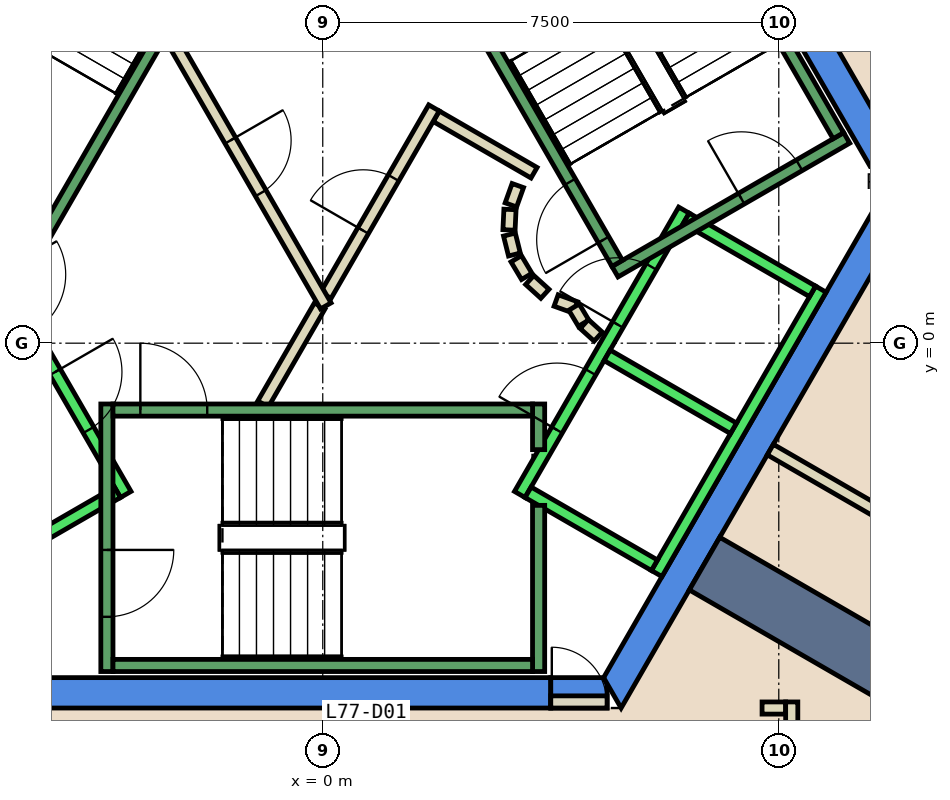
"""IFC4 building model, lengths in metres.
Left out: names, types, materials, properties, quantities, classifications, styles, units other than length and angle.
Written with IfcOpenShell. Run it as: python <this file> out.ifc"""

import sys

from ifc_helpers import new_model, si_unit, direction, frame, frame_2d, origin, place, context, subcontext, project, spatial, polyline, rectangle, outline, extrude, element, fill, save


model = new_model("IFC4")
c1 = context("Model", 3, precision=1e-05, world=origin(), true_north=direction((0.0, 1.0)))
c2 = subcontext(c1, "Body", "Model", "MODEL_VIEW")
j1 = project(units=[si_unit("LENGTHUNIT", "METRE"), si_unit("PLANEANGLEUNIT", "RADIAN")], contexts=[c1])
p1 = place(None, origin())
s1 = spatial("IfcSite", under=j1, at=p1, CompositionType="ELEMENT")
p2 = place(p1, origin())
s2 = spatial("IfcBuilding", under=s1, at=p2, CompositionType="ELEMENT")
p3 = place(p2, frame((0.0, 0.0, 326.0)))
s3 = spatial("IfcBuildingStorey", under=s2, at=p3, CompositionType="ELEMENT", Elevation=326.0)
p4 = place(p3, frame((0.0, 0.0, -0.6)))
e1 = element("IfcWall", 1, at=p4, inside=s3, PredefinedType="SHEAR", context=c2, shape_type="SweptSolid", body=[
    extrude(outline(polyline([(5.486, 9.998), (5.053, 9.748), (9.238, 2.5), (9.815, 2.5), (5.486, 9.998)])), origin(), (0.0, 0.0, 1.0), 5.55),
])
p5 = place(p3, frame((0.0, 0.0, -0.6)))
e2 = element("IfcWall", 2, at=p5, inside=s3, PredefinedType="SHEAR", context=c2, shape_type="SweptSolid", body=[
    extrude(outline(polyline([(3.75, -6.0), (3.75, -5.5), (-4.619, -5.5), (-4.907, -6.0), (3.75, -6.0)])), origin(), (0.0, 0.0, 1.0), 5.55),
])
p6 = place(p3, frame((0.0, 0.0, 3.6)))
e3 = element("IfcWall", 3, at=p6, inside=s3, PredefinedType="SHEAR", context=c2, shape_type="SweptSolid", body=[
    extrude(outline(polyline([(4.676, -6.0), (4.676, -5.6), (4.619, -5.5), (3.75, -5.5), (3.75, -6.0), (4.676, -6.0)])), origin(), (0.0, 0.0, 1.0), 1.35),
])
p7 = place(p3, frame((0.0, 0.0, -0.6)))
e4 = element("IfcWall", 4, at=p7, inside=s3, PredefinedType="SHEAR", context=c2, shape_type="SweptSolid", body=[
    extrude(outline(polyline([(4.907, -6.0), (9.815, 2.5), (9.238, 2.5), (4.619, -5.5), (4.907, -6.0)])), origin(), (0.0, 0.0, 1.0), 5.55),
])
p8 = place(p3, frame((6.279, -3.625, 0.0), z_axis=(0.0, 0.0, 1.0), x_axis=(0.866025543801, -0.499999757484, 0.0)))
e5 = element("IfcWall", 5, at=p8, inside=s3, PredefinedType="SHEAR", context=c2, shape_type="SweptSolid", body=[
    extrude(rectangle(XDim=17.452, YDim=1.0, at=frame_2d((8.726, 0.0))), origin(), (0.0, 0.0, 1.0), 4.95),
])
p9 = place(p3, frame((-0.982, -1.0, 0.0), z_axis=(0.0, 0.0, 1.0), x_axis=(0.50024047865, 0.865886518847, 0.0)))
e6 = element("IfcWall", 6, at=p9, inside=s3, PredefinedType="PARTITIONING", context=c2, shape_type="SweptSolid", body=[
    extrude(rectangle(XDim=1.863, YDim=0.2, at=frame_2d((0.931, 0.0))), origin(), (0.0, 0.0, 1.0), 4.95),
])
p10 = place(p3, frame((1.866, 3.732, 0.0), z_axis=(0.0, 0.0, 1.0), x_axis=(0.866043361281, -0.499968895414, 0.0)))
e7 = element("IfcWall", 7, at=p10, inside=s3, PredefinedType="PARTITIONING", context=c2, shape_type="SweptSolid", body=[
    extrude(rectangle(XDim=1.858, YDim=0.2, at=frame_2d((0.929, 0.0))), origin(), (0.0, 0.0, 1.0), 4.95),
])
p11 = place(p3, frame((3.208, 2.592, 0.0), z_axis=(0.0, 0.0, 1.0), x_axis=(-0.337388820924, -0.941365382578, 0.0)))
e8 = element("IfcWall", 8, at=p11, inside=s3, PredefinedType="PARTITIONING", context=c2, shape_type="SweptSolid", body=[
    extrude(rectangle(XDim=0.338, YDim=0.2, at=frame_2d((0.169, 0.0))), origin(), (0.0, 0.0, 1.0), 4.95),
])
p12 = place(p3, frame((3.079, 2.199, 0.0), z_axis=(0.0, 0.0, 1.0), x_axis=(-0.047771483479, -0.998858290933, 0.0)))
e9 = element("IfcWall", 9, at=p12, inside=s3, PredefinedType="PARTITIONING", context=c2, shape_type="SweptSolid", body=[
    extrude(rectangle(XDim=0.337, YDim=0.2, at=frame_2d((0.169, 0.0))), origin(), (0.0, 0.0, 1.0), 4.95),
])
p13 = place(p3, frame((3.07, 1.786, 0.0), z_axis=(0.0, 0.0, 1.0), x_axis=(0.242705583207, -0.970099994784, 0.0)))
e10 = element("IfcWall", 10, at=p13, inside=s3, PredefinedType="PARTITIONING", context=c2, shape_type="SweptSolid", body=[
    extrude(rectangle(XDim=0.338, YDim=0.2, at=frame_2d((0.169, 0.0))), origin(), (0.0, 0.0, 1.0), 4.95),
])
for number, where, z_axis, x_axis in (
    (11, (3.182, 1.388, 0.0), (0.0, 0.0, 1.0), (0.512, -0.859, 0.0)),
    (12, (3.404, 1.039, 0.0), (0.0, 0.0, 1.0), (0.74, -0.672, 0.0)),
):
    element("IfcWall", number, at=place(p3, frame(where, z_axis=z_axis, x_axis=x_axis)), inside=s3, PredefinedType="PARTITIONING", context=c2, shape_type="SweptSolid", body=[
        extrude(rectangle(XDim=0.338, YDim=0.2, at=frame_2d((0.169, 0.0))), origin(), (0.0, 0.0, 1.0), 4.95),
    ])
p14 = place(p3, frame((3.838, 0.702, 0.0), z_axis=(0.0, 0.0, 1.0), x_axis=(0.941035081519, -0.338308993895, 0.0)))
e13 = element("IfcWall", 13, at=p14, inside=s3, PredefinedType="PARTITIONING", context=c2, shape_type="SweptSolid", body=[
    extrude(rectangle(XDim=0.337, YDim=0.2, at=frame_2d((0.168, 0.0))), origin(), (0.0, 0.0, 1.0), 4.95),
])
p15 = place(p3, frame((4.132, 0.593, 0.0), z_axis=(0.0, 0.0, 1.0), x_axis=(0.513561617048, -0.858052717201, 0.0)))
e14 = element("IfcWall", 14, at=p15, inside=s3, PredefinedType="PARTITIONING", context=c2, shape_type="SweptSolid", body=[
    extrude(rectangle(XDim=0.308, YDim=0.2, at=frame_2d((0.154, 0.0))), origin(), (0.0, 0.0, 1.0), 4.95),
])
p16 = place(p3, frame((4.301, 0.315, 0.0), z_axis=(0.0, 0.0, 1.0), x_axis=(0.741798017506, -0.670623367639, 0.0)))
e15 = element("IfcWall", 15, at=p16, inside=s3, PredefinedType="PARTITIONING", context=c2, shape_type="SweptSolid", body=[
    extrude(rectangle(XDim=0.309, YDim=0.2, at=frame_2d((0.154, 0.0))), origin(), (0.0, 0.0, 1.0), 4.95),
])
p17 = place(p3, frame((0.05, 0.787, 0.0), z_axis=(0.0, 0.0, 1.0), x_axis=(0.499954076797, 0.866051915934, 0.0)))
e16 = element("IfcWall", 16, at=p17, inside=s3, PredefinedType="PARTITIONING", context=c2, shape_type="SweptSolid", body=[
    extrude(rectangle(XDim=3.558, YDim=0.2, at=frame_2d((1.779, 0.0))), origin(), (0.0, 0.0, 1.0), 4.95),
])
p18 = place(p17, frame((1.229, 0.0, 0.0)))
e17 = element("IfcOpeningElement", 17, at=p18, cuts=e16, PredefinedType="OPENING", context=c2, shape_type="SweptSolid", body=[
    extrude(rectangle(XDim=1.0, YDim=2.1, at=frame_2d((0.5, 1.05))), frame((0.0, 0.11, 0.0), z_axis=(0.0, -1.0, 0.0), x_axis=(1.0, 0.0, 0.0)), (0.0, 0.0, 1.0), 0.22),
])
p19 = place(p3, frame((-2.54, 5.1, 0.0), z_axis=(0.0, 0.0, 1.0), x_axis=(0.499925051871, -0.866068670783, 0.0)))
e18 = element("IfcWall", 18, at=p19, inside=s3, PredefinedType="PARTITIONING", context=c2, shape_type="SweptSolid", body=[
    extrude(rectangle(XDim=5.181, YDim=0.2, at=frame_2d((2.59, 0.0))), origin(), (0.0, 0.0, 1.0), 4.95),
])
p20 = place(p19, frame((2.04, 0.0, 0.0)))
e19 = element("IfcOpeningElement", 19, at=p20, cuts=e18, PredefinedType="OPENING", context=c2, shape_type="SweptSolid", body=[
    extrude(rectangle(XDim=1.0, YDim=2.1, at=frame_2d((0.5, 1.05))), frame((0.0, 0.11, 0.0), z_axis=(0.0, -1.0, 0.0), x_axis=(1.0, 0.0, 0.0)), (0.0, 0.0, 1.0), 0.22),
])
p21 = place(p3, frame((0.713, -6.0, 0.0), z_axis=(0.0, 0.0, 1.0), x_axis=(0.0, -1.0, 0.0)))
e20 = element("IfcWall", 20, at=p21, inside=s3, PredefinedType="PARTITIONING", context=c2, shape_type="SweptSolid", body=[
    extrude(rectangle(XDim=2.95, YDim=0.2, at=frame_2d((1.475, 0.0))), origin(), (0.0, 0.0, 1.0), 4.95),
])
p22 = place(p21, frame((0.586, 0.0, 0.0)))
e21 = element("IfcOpeningElement", 21, at=p22, cuts=e20, PredefinedType="OPENING", context=c2, shape_type="SweptSolid", body=[
    extrude(rectangle(XDim=1.0, YDim=2.1, at=frame_2d((0.5, 1.05))), frame((0.0, 0.11, 0.0), z_axis=(0.0, -1.0, 0.0), x_axis=(1.0, 0.0, 0.0)), (0.0, 0.0, 1.0), 0.22),
])
p23 = place(p3, frame((7.225, -6.0, 0.0), z_axis=(0.0, 0.0, 1.0), x_axis=(1.0, 0.0, 0.0)))
e22 = element("IfcWall", 22, at=p23, inside=s3, PredefinedType="PARTITIONING", context=c2, shape_type="SweptSolid", body=[
    extrude(rectangle(XDim=0.388, YDim=0.2, at=frame_2d((0.194, 0.0))), origin(), (0.0, 0.0, 1.0), 2.55),
])
p24 = place(p3, frame((7.713, -5.9, 0.0), z_axis=(0.0, 0.0, 1.0), x_axis=(0.0, -1.0, 0.0)))
e23 = element("IfcWall", 23, at=p24, inside=s3, PredefinedType="PARTITIONING", context=c2, shape_type="SweptSolid", body=[
    extrude(rectangle(XDim=0.574, YDim=0.2, at=frame_2d((0.287, 0.0))), origin(), (0.0, 0.0, 1.0), 2.55),
])
p25 = place(p3, frame((7.361, -1.75, 0.0), z_axis=(0.0, 0.0, 1.0), x_axis=(0.866053019151, -0.499952165731, 0.0)))
e24 = element("IfcWall", 24, at=p25, inside=s3, PredefinedType="PARTITIONING", context=c2, shape_type="SweptSolid", body=[
    extrude(rectangle(XDim=2.3, YDim=0.2, at=frame_2d((1.15, 0.0))), origin(), (0.0, 0.0, 1.0), 4.95),
])
p26 = place(p3, frame((3.75, -5.9, 0.0), z_axis=(0.0, 0.0, 1.0), x_axis=(1.0, 0.0, 0.0)))
e25 = element("IfcWall", 25, at=p26, inside=s3, PredefinedType="PARTITIONING", context=c2, shape_type="SweptSolid", body=[
    extrude(rectangle(XDim=0.926, YDim=0.2, at=frame_2d((0.463, 0.0))), origin(), (0.0, 0.0, 1.0), 2.4),
])
p27 = place(p26, frame((0.017, 0.0, 0.0)))
e26 = element("IfcOpeningElement", 26, at=p27, cuts=e25, PredefinedType="OPENING", context=c2, shape_type="SweptSolid", body=[
    extrude(rectangle(XDim=0.9, YDim=2.1, at=frame_2d((0.45, 1.05))), frame((0.0, 0.11, 0.0), z_axis=(0.0, -1.0, 0.0), x_axis=(1.0, 0.0, 0.0)), (0.0, 0.0, 1.0), 0.22),
])
p28 = place(p3, frame((-5.94, 2.188, 0.0), z_axis=(0.0, 0.0, 1.0), x_axis=(0.500034260056, -0.866005622828, 0.0)))
e27 = element("IfcWall", 27, at=p28, inside=s3, PredefinedType="STANDARD", context=c2, shape_type="SweptSolid", body=[
    extrude(rectangle(XDim=5.399, YDim=0.2, at=frame_2d((2.7, 0.0))), origin(), (0.0, 0.0, 1.0), 4.95),
])
p29 = place(p28, frame((3.075, 0.0, 0.0)))
e28 = element("IfcOpeningElement", 28, at=p29, cuts=e27, PredefinedType="OPENING", context=c2, shape_type="SweptSolid", body=[
    extrude(rectangle(XDim=1.1, YDim=2.1, at=frame_2d((0.55, 1.05))), frame((0.0, 0.11, 0.0), z_axis=(0.0, -1.0, 0.0), x_axis=(1.0, 0.0, 0.0)), (0.0, 0.0, 1.0), 0.22),
])
p30 = place(p28, frame((1.225, 0.0, 0.0)))
e29 = element("IfcOpeningElement", 29, at=p30, cuts=e27, PredefinedType="OPENING", context=c2, shape_type="SweptSolid", body=[
    extrude(rectangle(XDim=1.1, YDim=2.1, at=frame_2d((0.55, 1.05))), frame((0.0, 0.11, 0.0), z_axis=(0.0, -1.0, 0.0), x_axis=(1.0, 0.0, 0.0)), (0.0, 0.0, 1.0), 0.22),
])
p31 = place(p3, frame((-3.377, -2.452, 0.0), z_axis=(0.0, 0.0, 1.0), x_axis=(-0.865955154139, -0.50012165622, 0.0)))
e30 = element("IfcWall", 30, at=p31, inside=s3, PredefinedType="STANDARD", context=c2, shape_type="SweptSolid", body=[
    extrude(rectangle(XDim=2.4, YDim=0.2, at=frame_2d((1.2, 0.0))), origin(), (0.0, 0.0, 1.0), 4.95),
])
p32 = place(p3, frame((3.24, -2.488, 0.0), z_axis=(0.0, 0.0, 1.0), x_axis=(0.500034260056, 0.866005622828, 0.0)))
e31 = element("IfcWall", 31, at=p32, inside=s3, PredefinedType="STANDARD", context=c2, shape_type="SweptSolid", body=[
    extrude(rectangle(XDim=5.399, YDim=0.2, at=frame_2d((2.7, 0.0))), origin(), (0.0, 0.0, 1.0), 4.95),
])
p33 = place(p32, frame((3.225, 0.0, 0.0)))
e32 = element("IfcOpeningElement", 32, at=p33, cuts=e31, PredefinedType="OPENING", context=c2, shape_type="SweptSolid", body=[
    extrude(rectangle(XDim=1.1, YDim=2.1, at=frame_2d((0.55, 1.05))), frame((0.0, 0.11, 0.0), z_axis=(0.0, -1.0, 0.0), x_axis=(1.0, 0.0, 0.0)), (0.0, 0.0, 1.0), 0.22),
])
p34 = place(p32, frame((1.225, 0.0, 0.0)))
e33 = element("IfcOpeningElement", 33, at=p34, cuts=e31, PredefinedType="OPENING", context=c2, shape_type="SweptSolid", body=[
    extrude(rectangle(XDim=1.1, YDim=2.1, at=frame_2d((0.55, 1.05))), frame((0.0, 0.11, 0.0), z_axis=(0.0, -1.0, 0.0), x_axis=(1.0, 0.0, 0.0)), (0.0, 0.0, 1.0), 0.22),
])
p35 = place(p3, frame((5.492, -3.788, 0.0), z_axis=(0.0, 0.0, 1.0), x_axis=(0.500034260056, 0.866005622828, 0.0)))
e34 = element("IfcWall", 34, at=p35, inside=s3, PredefinedType="STANDARD", context=c2, shape_type="SweptSolid", body=[
    extrude(rectangle(XDim=5.399, YDim=0.2, at=frame_2d((2.7, 0.0))), origin(), (0.0, 0.0, 1.0), 4.95),
])
p36 = place(p3, frame((3.377, -2.452, 0.0), z_axis=(0.0, 0.0, 1.0), x_axis=(0.865955154139, -0.50012165622, 0.0)))
e35 = element("IfcWall", 35, at=p36, inside=s3, PredefinedType="STANDARD", context=c2, shape_type="SweptSolid", body=[
    extrude(rectangle(XDim=2.4, YDim=0.2, at=frame_2d((1.2, 0.0))), origin(), (0.0, 0.0, 1.0), 4.95),
])
for number, where, z_axis, x_axis in (
    (36, (4.677, -0.2, 0.0), (0.0, 0.0, 1.0), (0.866, -0.5, 0.0)),
    (37, (5.977, 2.052, 0.0), (0.0, 0.0, 1.0), (0.866, -0.5, 0.0)),
):
    element("IfcWall", number, at=place(p3, frame(where, z_axis=z_axis, x_axis=x_axis)), inside=s3, PredefinedType="STANDARD", context=c2, shape_type="SweptSolid", body=[
        extrude(rectangle(XDim=2.399, YDim=0.2, at=frame_2d((1.2, 0.0))), origin(), (0.0, 0.0, 1.0), 4.95),
    ])
p37 = place(p3, frame((-3.55, -1.0, 0.0), z_axis=(0.0, 0.0, 1.0), x_axis=(0.0, -1.0, 0.0)))
e38 = element("IfcWall", 38, at=p37, inside=s3, PredefinedType="STANDARD", context=c2, shape_type="SweptSolid", body=[
    extrude(rectangle(XDim=4.4, YDim=0.2, at=frame_2d((2.2, 0.0))), origin(), (0.0, 0.0, 1.0), 4.95),
])
p38 = place(p37, frame((2.4, 0.0, 0.0)))
e39 = element("IfcOpeningElement", 39, at=p38, cuts=e38, PredefinedType="OPENING", context=c2, shape_type="SweptSolid", body=[
    extrude(rectangle(XDim=1.1, YDim=2.2, at=frame_2d((0.55, 1.1))), frame((0.0, 0.11, 0.0), z_axis=(0.0, -1.0, 0.0), x_axis=(1.0, 0.0, 0.0)), (0.0, 0.0, 1.0), 0.22),
])
p39 = place(p3, frame((3.55, -2.667, 0.0), z_axis=(0.0, 0.0, 1.0), x_axis=(0.0, -1.0, 0.0)))
e40 = element("IfcWall", 40, at=p39, inside=s3, PredefinedType="STANDARD", context=c2, shape_type="SweptSolid", body=[
    extrude(rectangle(XDim=2.733, YDim=0.2, at=frame_2d((1.366, 0.0))), origin(), (0.0, 0.0, 1.0), 4.95),
])
p40 = place(p3, frame((3.55, -1.0, 0.0), z_axis=(0.0, 0.0, 1.0), x_axis=(0.0, -1.0, 0.0)))
e41 = element("IfcWall", 41, at=p40, inside=s3, PredefinedType="STANDARD", context=c2, shape_type="SweptSolid", body=[
    extrude(rectangle(XDim=0.751, YDim=0.2, at=frame_2d((0.375, 0.0))), origin(), (0.0, 0.0, 1.0), 4.95),
])
p41 = place(p3, frame((-3.45, -1.1, 0.0), z_axis=(0.0, 0.0, 1.0), x_axis=(1.0, 0.0, 0.0)))
e42 = element("IfcWall", 42, at=p41, inside=s3, PredefinedType="STANDARD", context=c2, shape_type="SweptSolid", body=[
    extrude(rectangle(XDim=6.9, YDim=0.2, at=frame_2d((3.45, 0.0))), origin(), (0.0, 0.0, 1.0), 4.95),
])
p42 = place(p41, frame((0.45, 0.0, 0.0)))
e43 = element("IfcOpeningElement", 43, at=p42, cuts=e42, PredefinedType="OPENING", context=c2, shape_type="SweptSolid", body=[
    extrude(rectangle(XDim=1.1, YDim=2.2, at=frame_2d((0.55, 1.1))), frame((0.0, 0.11, 0.0), z_axis=(0.0, -1.0, 0.0), x_axis=(1.0, 0.0, 0.0)), (0.0, 0.0, 1.0), 0.22),
])
p43 = place(p3, frame((-3.45, -5.3, 0.0), z_axis=(0.0, 0.0, 1.0), x_axis=(1.0, 0.0, 0.0)))
e44 = element("IfcWall", 44, at=p43, inside=s3, PredefinedType="STANDARD", context=c2, shape_type="SweptSolid", body=[
    extrude(rectangle(XDim=6.9, YDim=0.2, at=frame_2d((3.45, 0.0))), origin(), (0.0, 0.0, 1.0), 4.95),
])
p44 = place(p3, frame((4.806, 1.176, 0.0), z_axis=(0.0, 0.0, 1.0), x_axis=(0.866059941101, 0.499940174841, 0.0)))
e45 = element("IfcWall", 45, at=p44, inside=s3, PredefinedType="STANDARD", context=c2, shape_type="SweptSolid", body=[
    extrude(rectangle(XDim=4.4, YDim=0.2, at=frame_2d((2.2, 0.0))), origin(), (0.0, 0.0, 1.0), 4.95),
])
p45 = place(p44, frame((2.4, 0.0, 0.0)))
e46 = element("IfcOpeningElement", 46, at=p45, cuts=e45, PredefinedType="OPENING", context=c2, shape_type="SweptSolid", body=[
    extrude(rectangle(XDim=1.1, YDim=2.2, at=frame_2d((0.55, 1.1))), frame((0.0, 0.11, 0.0), z_axis=(0.0, -1.0, 0.0), x_axis=(1.0, 0.0, 0.0)), (0.0, 0.0, 1.0), 0.22),
])
p46 = place(p3, frame((4.843, 1.312, 0.0), z_axis=(0.0, 0.0, 1.0), x_axis=(-0.499963383562, 0.866046543262, 0.0)))
e47 = element("IfcWall", 47, at=p46, inside=s3, PredefinedType="STANDARD", context=c2, shape_type="SweptSolid", body=[
    extrude(rectangle(XDim=6.9, YDim=0.2, at=frame_2d((3.45, 0.0))), origin(), (0.0, 0.0, 1.0), 4.95),
])
p47 = place(p46, frame((0.45, 0.0, 0.0)))
e48 = element("IfcOpeningElement", 48, at=p47, cuts=e47, PredefinedType="OPENING", context=c2, shape_type="SweptSolid", body=[
    extrude(rectangle(XDim=1.1, YDim=2.2, at=frame_2d((0.55, 1.1))), frame((0.0, 0.11, 0.0), z_axis=(0.0, -1.0, 0.0), x_axis=(1.0, 0.0, 0.0)), (0.0, 0.0, 1.0), 0.22),
])
p48 = place(p3, frame((8.48, 3.412, 0.0), z_axis=(0.0, 0.0, 1.0), x_axis=(-0.499978703459, 0.866037698999, 0.0)))
e49 = element("IfcWall", 49, at=p48, inside=s3, PredefinedType="STANDARD", context=c2, shape_type="SweptSolid", body=[
    extrude(rectangle(XDim=6.9, YDim=0.2, at=frame_2d((3.45, 0.0))), origin(), (0.0, 0.0, 1.0), 4.95),
])
p49 = place(p3, frame((-1.393, 7.288, 0.0), z_axis=(0.0, 0.0, 1.0), x_axis=(-0.499963383562, -0.866046543262, 0.0)))
e50 = element("IfcWall", 50, at=p49, inside=s3, PredefinedType="STANDARD", context=c2, shape_type="SweptSolid", body=[
    extrude(rectangle(XDim=6.9, YDim=0.2, at=frame_2d((3.45, 0.0))), origin(), (0.0, 0.0, 1.0), 4.95),
])
p50 = place(p49, frame((0.45, 0.0, 0.0)))
e51 = element("IfcOpeningElement", 51, at=p50, cuts=e50, PredefinedType="OPENING", context=c2, shape_type="SweptSolid", body=[
    extrude(rectangle(XDim=1.1, YDim=2.2, at=frame_2d((0.55, 1.1))), frame((0.0, 0.11, 0.0), z_axis=(0.0, -1.0, 0.0), x_axis=(1.0, 0.0, 0.0)), (0.0, 0.0, 1.0), 0.22),
])
p51 = place(p18, origin())
e52 = element("IfcDoor", 52, at=p51, inside=s3, OperationType="SINGLE_SWING_RIGHT", PredefinedType="DOOR", context=c2, shape_type="SweptSolid", body=[
    extrude(rectangle(XDim=1.0, YDim=2.1, at=frame_2d((0.5, 1.05))), frame((0.0, 0.025, 0.0), z_axis=(0.0, -1.0, 0.0), x_axis=(1.0, 0.0, 0.0)), (0.0, 0.0, 1.0), 0.05),
])
fill(e17, e52)
p52 = place(p20, origin())
e53 = element("IfcDoor", 53, at=p52, inside=s3, OperationType="SINGLE_SWING_RIGHT", PredefinedType="DOOR", context=c2, shape_type="SweptSolid", body=[
    extrude(rectangle(XDim=1.0, YDim=2.1, at=frame_2d((0.5, 1.05))), frame((0.0, 0.025, 0.0), z_axis=(0.0, -1.0, 0.0), x_axis=(1.0, 0.0, 0.0)), (0.0, 0.0, 1.0), 0.05),
])
fill(e19, e53)
p53 = place(p27, origin())
e54 = element("IfcDoor", 54, at=p53, inside=s3, OperationType="SINGLE_SWING_LEFT", PredefinedType="DOOR", context=c2, shape_type="SweptSolid", body=[
    extrude(rectangle(XDim=0.9, YDim=2.1, at=frame_2d((0.45, 1.05))), frame((0.0, 0.025, 0.0), z_axis=(0.0, -1.0, 0.0), x_axis=(1.0, 0.0, 0.0)), (0.0, 0.0, 1.0), 0.05),
])
fill(e26, e54)
p54 = place(p33, origin())
e55 = element("IfcDoor", 55, at=p54, inside=s3, OperationType="SLIDING_TO_LEFT", PredefinedType="DOOR", context=c2, shape_type="SweptSolid", body=[
    extrude(rectangle(XDim=1.1, YDim=2.1, at=frame_2d((0.55, 1.05))), frame((0.0, 0.025, 0.0), z_axis=(0.0, -1.0, 0.0), x_axis=(1.0, 0.0, 0.0)), (0.0, 0.0, 1.0), 0.05),
])
fill(e32, e55)
p55 = place(p29, origin())
e56 = element("IfcDoor", 56, at=p55, inside=s3, OperationType="SLIDING_TO_LEFT", PredefinedType="DOOR", context=c2, shape_type="SweptSolid", body=[
    extrude(rectangle(XDim=1.1, YDim=2.1, at=frame_2d((0.55, 1.05))), frame((0.0, 0.025, 0.0), z_axis=(0.0, -1.0, 0.0), x_axis=(1.0, 0.0, 0.0)), (0.0, 0.0, 1.0), 0.05),
])
fill(e28, e56)
p56 = place(p34, origin())
e57 = element("IfcDoor", 57, at=p56, inside=s3, OperationType="SLIDING_TO_LEFT", PredefinedType="DOOR", context=c2, shape_type="SweptSolid", body=[
    extrude(rectangle(XDim=1.1, YDim=2.1, at=frame_2d((0.55, 1.05))), frame((0.0, 0.025, 0.0), z_axis=(0.0, -1.0, 0.0), x_axis=(1.0, 0.0, 0.0)), (0.0, 0.0, 1.0), 0.05),
])
fill(e33, e57)
p57 = place(p42, origin())
e58 = element("IfcDoor", 58, at=p57, inside=s3, OperationType="SINGLE_SWING_LEFT", PredefinedType="DOOR", context=c2, shape_type="SweptSolid", body=[
    extrude(rectangle(XDim=1.1, YDim=2.2, at=frame_2d((0.55, 1.1))), frame((0.0, 0.025, 0.0), z_axis=(0.0, -1.0, 0.0), x_axis=(1.0, 0.0, 0.0)), (0.0, 0.0, 1.0), 0.05),
])
fill(e43, e58)
p58 = place(p38, origin())
e59 = element("IfcDoor", 59, at=p58, inside=s3, OperationType="SINGLE_SWING_LEFT", PredefinedType="DOOR", context=c2, shape_type="SweptSolid", body=[
    extrude(rectangle(XDim=1.1, YDim=2.2, at=frame_2d((0.55, 1.1))), frame((0.0, 0.025, 0.0), z_axis=(0.0, -1.0, 0.0), x_axis=(1.0, 0.0, 0.0)), (0.0, 0.0, 1.0), 0.05),
])
fill(e39, e59)
p59 = place(p47, origin())
e60 = element("IfcDoor", 60, at=p59, inside=s3, OperationType="SINGLE_SWING_LEFT", PredefinedType="DOOR", context=c2, shape_type="SweptSolid", body=[
    extrude(rectangle(XDim=1.1, YDim=2.2, at=frame_2d((0.55, 1.1))), frame((0.0, 0.025, 0.0), z_axis=(0.0, -1.0, 0.0), x_axis=(1.0, 0.0, 0.0)), (0.0, 0.0, 1.0), 0.05),
])
fill(e48, e60)
p60 = place(p45, origin())
e61 = element("IfcDoor", 61, at=p60, inside=s3, OperationType="SINGLE_SWING_LEFT", PredefinedType="DOOR", context=c2, shape_type="SweptSolid", body=[
    extrude(rectangle(XDim=1.1, YDim=2.2, at=frame_2d((0.55, 1.1))), frame((0.0, 0.025, 0.0), z_axis=(0.0, -1.0, 0.0), x_axis=(1.0, 0.0, 0.0)), (0.0, 0.0, 1.0), 0.05),
])
fill(e46, e61)
save(model, sys.argv[1])
